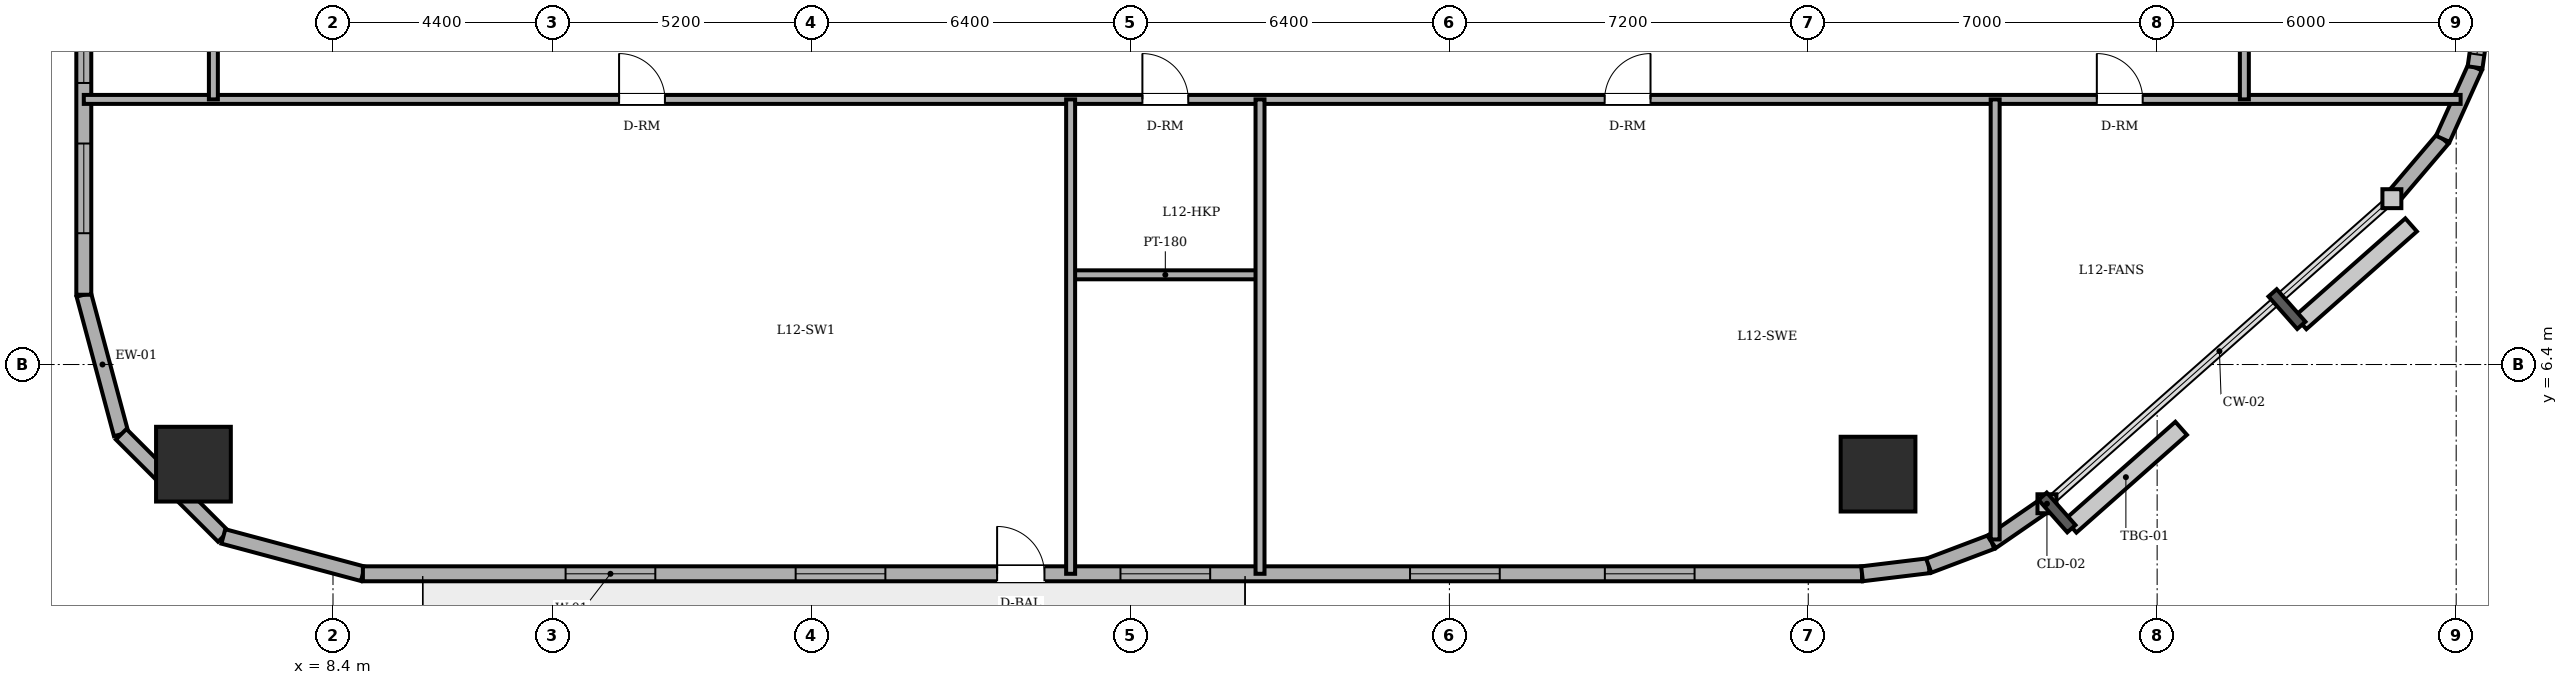
"""IFC4 building model, lengths in metres.
Left out: names, types, materials, properties, quantities, classifications, styles, units other than length and angle.
Written with IfcOpenShell. Run it as: python <this file> out.ifc"""

import sys

from ifc_helpers import new_model, si_unit, direction, frame, frame_2d, origin, origin_2d, place, context, subcontext, project, spatial, rectangle, circle, extrude, element, fill, save


model = new_model("IFC4")
c1 = context("Model", 3, precision=1e-05, world=origin(), true_north=direction((0.0, 1.0)))
c2 = subcontext(c1, "Body", "Model", "MODEL_VIEW")
j1 = project(units=[si_unit("LENGTHUNIT", "METRE"), si_unit("PLANEANGLEUNIT", "RADIAN")], contexts=[c1])
p1 = place(None, origin())
s1 = spatial("IfcSite", under=j1, at=p1, CompositionType="ELEMENT")
p2 = place(p1, origin())
s2 = spatial("IfcBuilding", under=s1, at=p2, CompositionType="ELEMENT")
p3 = place(p2, frame((0.0, 0.0, 46.8)))
s3 = spatial("IfcBuildingStorey", under=s2, at=p3, CompositionType="ELEMENT", Elevation=46.8)
for number, where, z_axis, x_axis in (
    (1, (5.6, 4.4, 0.0), (0.0, 0.0, 1.0), (1.0, 0.0, 0.0)),
    (2, (39.4, 4.2, 0.0), (0.0, 0.0, 1.0), (1.0, 0.0, 0.0)),
):
    element("IfcColumn", number, at=place(p3, frame(where, z_axis=z_axis, x_axis=x_axis)), inside=s3, PredefinedType="COLUMN", context=c2, shape_type="SweptSolid", body=[
        extrude(circle(Radius=0.75, at=origin_2d()), origin(), (0.0, 0.0, 1.0), 3.6),
    ])
p4 = place(p3, frame((3.4, 7.8, 0.0), z_axis=(0.0, 0.0, 1.0), x_axis=(0.258731875344, -0.96594917914, 0.0)))
e3 = element("IfcWall", 3, at=p4, inside=s3, PredefinedType="SOLIDWALL", context=c2, shape_type="SweptSolid", body=[
    extrude(rectangle(XDim=2.899, YDim=0.3, at=frame_2d((1.449, 0.0))), origin(), (0.0, 0.0, 1.0), 3.4),
])
p5 = place(p3, frame((4.15, 5.0, 0.0), z_axis=(0.0, 0.0, 1.0), x_axis=(0.707106781187, -0.707106781187, 0.0)))
e4 = element("IfcWall", 4, at=p5, inside=s3, PredefinedType="SOLIDWALL", context=c2, shape_type="SweptSolid", body=[
    extrude(rectangle(XDim=2.899, YDim=0.3, at=frame_2d((1.45, 0.0))), origin(), (0.0, 0.0, 1.0), 3.4),
])
p6 = place(p3, frame((6.2, 2.95, 0.0), z_axis=(0.0, 0.0, 1.0), x_axis=(0.96594917914, -0.258731875344, 0.0)))
e5 = element("IfcWall", 5, at=p6, inside=s3, PredefinedType="SOLIDWALL", context=c2, shape_type="SweptSolid", body=[
    extrude(rectangle(XDim=2.899, YDim=0.3, at=frame_2d((1.449, 0.0))), origin(), (0.0, 0.0, 1.0), 3.4),
])
p7 = place(p3, frame((9.0, 2.2, 0.0), z_axis=(0.0, 0.0, 1.0), x_axis=(1.0, 0.0, 0.0)))
e6 = element("IfcWall", 6, at=p7, inside=s3, PredefinedType="SOLIDWALL", context=c2, shape_type="SweptSolid", body=[
    extrude(rectangle(XDim=30.079, YDim=0.3, at=frame_2d((15.04, 0.0))), origin(), (0.0, 0.0, 1.0), 3.4),
])
p8 = place(p7, frame((12.725, 0.0, 0.0)))
e7 = element("IfcOpeningElement", 7, at=p8, cuts=e6, PredefinedType="OPENING", context=c2, shape_type="SweptSolid", body=[
    extrude(rectangle(XDim=0.95, YDim=2.2, at=frame_2d((0.475, 1.1))), frame((0.0, 0.16, 0.0), z_axis=(0.0, -1.0, 0.0), x_axis=(1.0, 0.0, 0.0)), (0.0, 0.0, 1.0), 0.32),
])
p9 = place(p7, frame((4.067, 0.0, 0.85)))
e8 = element("IfcOpeningElement", 8, at=p9, cuts=e6, PredefinedType="OPENING", context=c2, shape_type="SweptSolid", body=[
    extrude(rectangle(XDim=1.8, YDim=1.55, at=frame_2d((0.9, 0.775))), frame((0.0, 0.16, 0.0), z_axis=(0.0, -1.0, 0.0), x_axis=(1.0, 0.0, 0.0)), (0.0, 0.0, 1.0), 0.32),
])
p10 = place(p7, frame((8.683, 0.0, 0.85)))
e9 = element("IfcOpeningElement", 9, at=p10, cuts=e6, PredefinedType="OPENING", context=c2, shape_type="SweptSolid", body=[
    extrude(rectangle(XDim=1.8, YDim=1.55, at=frame_2d((0.9, 0.775))), frame((0.0, 0.16, 0.0), z_axis=(0.0, -1.0, 0.0), x_axis=(1.0, 0.0, 0.0)), (0.0, 0.0, 1.0), 0.32),
])
p11 = place(p7, frame((15.2, 0.0, 0.85)))
e10 = element("IfcOpeningElement", 10, at=p11, cuts=e6, PredefinedType="OPENING", context=c2, shape_type="SweptSolid", body=[
    extrude(rectangle(XDim=1.8, YDim=1.55, at=frame_2d((0.9, 0.775))), frame((0.0, 0.16, 0.0), z_axis=(0.0, -1.0, 0.0), x_axis=(1.0, 0.0, 0.0)), (0.0, 0.0, 1.0), 0.32),
])
p12 = place(p7, frame((21.01, 0.0, 0.85)))
e11 = element("IfcOpeningElement", 11, at=p12, cuts=e6, PredefinedType="OPENING", context=c2, shape_type="SweptSolid", body=[
    extrude(rectangle(XDim=1.8, YDim=1.55, at=frame_2d((0.9, 0.775))), frame((0.0, 0.16, 0.0), z_axis=(0.0, -1.0, 0.0), x_axis=(1.0, 0.0, 0.0)), (0.0, 0.0, 1.0), 0.32),
])
p13 = place(p7, frame((24.919, 0.0, 0.85)))
e12 = element("IfcOpeningElement", 12, at=p13, cuts=e6, PredefinedType="OPENING", context=c2, shape_type="SweptSolid", body=[
    extrude(rectangle(XDim=1.8, YDim=1.55, at=frame_2d((0.9, 0.775))), frame((0.0, 0.16, 0.0), z_axis=(0.0, -1.0, 0.0), x_axis=(1.0, 0.0, 0.0)), (0.0, 0.0, 1.0), 0.32),
])
p14 = place(p3, frame((39.079, 2.2, 0.0), z_axis=(0.0, 0.0, 1.0), x_axis=(0.992739027259, 0.120288086515, 0.0)))
e13 = element("IfcWall", 13, at=p14, inside=s3, PredefinedType="SOLIDWALL", context=c2, shape_type="SweptSolid", body=[
    extrude(rectangle(XDim=1.348, YDim=0.3, at=frame_2d((0.674, 0.0))), origin(), (0.0, 0.0, 1.0), 3.4),
])
p15 = place(p3, frame((40.417, 2.362, 0.0), z_axis=(0.0, 0.0, 1.0), x_axis=(0.935156721165, 0.354234254216, 0.0)))
e14 = element("IfcWall", 14, at=p15, inside=s3, PredefinedType="SOLIDWALL", context=c2, shape_type="SweptSolid", body=[
    extrude(rectangle(XDim=1.349, YDim=0.3, at=frame_2d((0.675, 0.0))), origin(), (0.0, 0.0, 1.0), 3.4),
])
p16 = place(p3, frame((41.679, 2.84, 0.0), z_axis=(0.0, 0.0, 1.0), x_axis=(0.823116500192, 0.567872544777, 0.0)))
e15 = element("IfcWall", 15, at=p16, inside=s3, PredefinedType="SOLIDWALL", context=c2, shape_type="SweptSolid", body=[
    extrude(rectangle(XDim=1.349, YDim=0.3, at=frame_2d((0.674, 0.0))), origin(), (0.0, 0.0, 1.0), 3.4),
])
p17 = place(p3, frame((49.71, 9.728, 0.0), z_axis=(0.0, 0.0, 1.0), x_axis=(0.648389989909, 0.7613083613, 0.0)))
e16 = element("IfcWall", 16, at=p17, inside=s3, PredefinedType="SOLIDWALL", context=c2, shape_type="SweptSolid", body=[
    extrude(rectangle(XDim=1.576, YDim=0.3, at=frame_2d((0.788, 0.0))), origin(), (0.0, 0.0, 1.0), 3.4),
])
p18 = place(p3, frame((50.732, 10.928, 0.0), z_axis=(0.0, 0.0, 1.0), x_axis=(0.410996558744, 0.911636895206, 0.0)))
e17 = element("IfcWall", 17, at=p18, inside=s3, PredefinedType="SOLIDWALL", context=c2, shape_type="SweptSolid", body=[
    extrude(rectangle(XDim=1.574, YDim=0.3, at=frame_2d((0.787, 0.0))), origin(), (0.0, 0.0, 1.0), 3.4),
])
p19 = place(p3, frame((51.379, 12.363, 0.0), z_axis=(0.0, 0.0, 1.0), x_axis=(0.140380048512, 0.990097693149, 0.0)))
e18 = element("IfcWall", 18, at=p19, inside=s3, PredefinedType="SOLIDWALL", context=c2, shape_type="SweptSolid", body=[
    extrude(rectangle(XDim=1.576, YDim=0.3, at=frame_2d((0.788, 0.0))), origin(), (0.0, 0.0, 1.0), 3.4),
])
p20 = place(p19, frame((0.263, 0.0, 0.85)))
e19 = element("IfcOpeningElement", 19, at=p20, cuts=e18, PredefinedType="OPENING", context=c2, shape_type="SweptSolid", body=[
    extrude(rectangle(XDim=1.05, YDim=1.55, at=frame_2d((0.525, 0.775))), frame((0.0, 0.16, 0.0), z_axis=(0.0, -1.0, 0.0), x_axis=(1.0, 0.0, 0.0)), (0.0, 0.0, 1.0), 0.32),
])
p21 = place(p3, frame((3.4, 40.2, 0.0), z_axis=(0.0, 0.0, 1.0), x_axis=(0.0, -1.0, 0.0)))
e20 = element("IfcWall", 20, at=p21, inside=s3, PredefinedType="SOLIDWALL", context=c2, shape_type="SweptSolid", body=[
    extrude(rectangle(XDim=32.4, YDim=0.3, at=frame_2d((16.2, 0.0))), origin(), (0.0, 0.0, 1.0), 3.4),
])
p22 = place(p21, frame((1.235, 0.0, 0.85)))
e21 = element("IfcOpeningElement", 21, at=p22, cuts=e20, PredefinedType="OPENING", context=c2, shape_type="SweptSolid", body=[
    extrude(rectangle(XDim=1.8, YDim=1.55, at=frame_2d((0.9, 0.775))), frame((0.0, 0.16, 0.0), z_axis=(0.0, -1.0, 0.0), x_axis=(1.0, 0.0, 0.0)), (0.0, 0.0, 1.0), 0.32),
])
p23 = place(p21, frame((4.25, 0.0, 0.85)))
e22 = element("IfcOpeningElement", 22, at=p23, cuts=e20, PredefinedType="OPENING", context=c2, shape_type="SweptSolid", body=[
    extrude(rectangle(XDim=1.8, YDim=1.55, at=frame_2d((0.9, 0.775))), frame((0.0, 0.16, 0.0), z_axis=(0.0, -1.0, 0.0), x_axis=(1.0, 0.0, 0.0)), (0.0, 0.0, 1.0), 0.32),
])
p24 = place(p21, frame((9.253, 0.0, 0.85)))
e23 = element("IfcOpeningElement", 23, at=p24, cuts=e20, PredefinedType="OPENING", context=c2, shape_type="SweptSolid", body=[
    extrude(rectangle(XDim=1.8, YDim=1.55, at=frame_2d((0.9, 0.775))), frame((0.0, 0.16, 0.0), z_axis=(0.0, -1.0, 0.0), x_axis=(1.0, 0.0, 0.0)), (0.0, 0.0, 1.0), 0.32),
])
p25 = place(p21, frame((13.027, 0.0, 0.85)))
e24 = element("IfcOpeningElement", 24, at=p25, cuts=e20, PredefinedType="OPENING", context=c2, shape_type="SweptSolid", body=[
    extrude(rectangle(XDim=1.8, YDim=1.55, at=frame_2d((0.9, 0.775))), frame((0.0, 0.16, 0.0), z_axis=(0.0, -1.0, 0.0), x_axis=(1.0, 0.0, 0.0)), (0.0, 0.0, 1.0), 0.32),
])
p26 = place(p21, frame((19.573, 0.0, 0.85)))
e25 = element("IfcOpeningElement", 25, at=p26, cuts=e20, PredefinedType="OPENING", context=c2, shape_type="SweptSolid", body=[
    extrude(rectangle(XDim=1.8, YDim=1.55, at=frame_2d((0.9, 0.775))), frame((0.0, 0.16, 0.0), z_axis=(0.0, -1.0, 0.0), x_axis=(1.0, 0.0, 0.0)), (0.0, 0.0, 1.0), 0.32),
])
p27 = place(p21, frame((22.347, 0.0, 0.85)))
e26 = element("IfcOpeningElement", 26, at=p27, cuts=e20, PredefinedType="OPENING", context=c2, shape_type="SweptSolid", body=[
    extrude(rectangle(XDim=1.8, YDim=1.55, at=frame_2d((0.9, 0.775))), frame((0.0, 0.16, 0.0), z_axis=(0.0, -1.0, 0.0), x_axis=(1.0, 0.0, 0.0)), (0.0, 0.0, 1.0), 0.32),
])
p28 = place(p21, frame((26.35, 0.0, 0.85)))
e27 = element("IfcOpeningElement", 27, at=p28, cuts=e20, PredefinedType="OPENING", context=c2, shape_type="SweptSolid", body=[
    extrude(rectangle(XDim=1.8, YDim=1.55, at=frame_2d((0.9, 0.775))), frame((0.0, 0.16, 0.0), z_axis=(0.0, -1.0, 0.0), x_axis=(1.0, 0.0, 0.0)), (0.0, 0.0, 1.0), 0.32),
])
p29 = place(p21, frame((29.365, 0.0, 0.85)))
e28 = element("IfcOpeningElement", 28, at=p29, cuts=e20, PredefinedType="OPENING", context=c2, shape_type="SweptSolid", body=[
    extrude(rectangle(XDim=1.8, YDim=1.55, at=frame_2d((0.9, 0.775))), frame((0.0, 0.16, 0.0), z_axis=(0.0, -1.0, 0.0), x_axis=(1.0, 0.0, 0.0)), (0.0, 0.0, 1.0), 0.32),
])
p30 = place(p3, frame((23.2, 8.2, 0.0), z_axis=(0.0, 0.0, 1.0), x_axis=(1.0, 0.0, 0.0)))
e29 = element("IfcWall", 29, at=p30, inside=s3, PredefinedType="PARTITIONING", context=c2, shape_type="SweptSolid", body=[
    extrude(rectangle(XDim=3.8, YDim=0.18, at=frame_2d((1.9, 0.0))), origin(), (0.0, 0.0, 1.0), 3.4),
])
p31 = place(p3, frame((3.4, 11.72, 0.0), z_axis=(0.0, 0.0, 1.0), x_axis=(1.0, 0.0, 0.0)))
e30 = element("IfcWall", 30, at=p31, inside=s3, PredefinedType="PARTITIONING", context=c2, shape_type="SweptSolid", body=[
    extrude(rectangle(XDim=47.689, YDim=0.18, at=frame_2d((23.845, 0.0))), origin(), (0.0, 0.0, 1.0), 3.4),
])
p32 = place(p31, frame((21.24, 0.0, 0.0)))
e31 = element("IfcOpeningElement", 31, at=p32, cuts=e30, PredefinedType="OPENING", context=c2, shape_type="SweptSolid", body=[
    extrude(rectangle(XDim=0.92, YDim=2.1, at=frame_2d((0.46, 1.05))), frame((0.0, 0.1, 0.0), z_axis=(0.0, -1.0, 0.0), x_axis=(1.0, 0.0, 0.0)), (0.0, 0.0, 1.0), 0.2),
])
p33 = place(p31, frame((40.39, 0.0, 0.0)))
e32 = element("IfcOpeningElement", 32, at=p33, cuts=e30, PredefinedType="OPENING", context=c2, shape_type="SweptSolid", body=[
    extrude(rectangle(XDim=0.92, YDim=2.1, at=frame_2d((0.46, 1.05))), frame((0.0, 0.1, 0.0), z_axis=(0.0, -1.0, 0.0), x_axis=(1.0, 0.0, 0.0)), (0.0, 0.0, 1.0), 0.2),
])
p34 = place(p31, frame((10.74, 0.0, 0.0)))
e33 = element("IfcOpeningElement", 33, at=p34, cuts=e30, PredefinedType="OPENING", context=c2, shape_type="SweptSolid", body=[
    extrude(rectangle(XDim=0.92, YDim=2.1, at=frame_2d((0.46, 1.05))), frame((0.0, 0.1, 0.0), z_axis=(0.0, -1.0, 0.0), x_axis=(1.0, 0.0, 0.0)), (0.0, 0.0, 1.0), 0.2),
])
p35 = place(p31, frame((30.515, 0.0, 0.0)))
e34 = element("IfcOpeningElement", 34, at=p35, cuts=e30, PredefinedType="OPENING", context=c2, shape_type="SweptSolid", body=[
    extrude(rectangle(XDim=0.92, YDim=2.1, at=frame_2d((0.46, 1.05))), frame((0.0, 0.1, 0.0), z_axis=(0.0, -1.0, 0.0), x_axis=(1.0, 0.0, 0.0)), (0.0, 0.0, 1.0), 0.2),
])
p36 = place(p3, frame((6.0, 11.72, 0.0), z_axis=(0.0, 0.0, 1.0), x_axis=(0.0, 1.0, 0.0)))
e35 = element("IfcWall", 35, at=p36, inside=s3, PredefinedType="PARTITIONING", context=c2, shape_type="SweptSolid", body=[
    extrude(rectangle(XDim=2.46, YDim=0.18, at=frame_2d((1.23, 0.0))), origin(), (0.0, 0.0, 1.0), 3.4),
])
for number, where, z_axis, x_axis in (
    (36, (23.2, 2.2, 0.0), (0.0, 0.0, 1.0), (0.0, 1.0, 0.0)),
    (37, (27.0, 2.2, 0.0), (0.0, 0.0, 1.0), (0.0, 1.0, 0.0)),
):
    element("IfcWall", number, at=place(p3, frame(where, z_axis=z_axis, x_axis=x_axis)), inside=s3, PredefinedType="PARTITIONING", context=c2, shape_type="SweptSolid", body=[
        extrude(rectangle(XDim=9.52, YDim=0.18, at=frame_2d((4.76, 0.0))), origin(), (0.0, 0.0, 1.0), 3.4),
    ])
p37 = place(p3, frame((41.75, 2.889, 0.0), z_axis=(0.0, 0.0, 1.0), x_axis=(0.0, 1.0, 0.0)))
e38 = element("IfcWall", 38, at=p37, inside=s3, PredefinedType="PARTITIONING", context=c2, shape_type="SweptSolid", body=[
    extrude(rectangle(XDim=8.831, YDim=0.18, at=frame_2d((4.416, 0.0))), origin(), (0.0, 0.0, 1.0), 2.782),
])
p38 = place(p3, frame((46.75, 11.72, 0.0), z_axis=(0.0, 0.0, 1.0), x_axis=(0.0, 1.0, 0.0)))
e39 = element("IfcWall", 39, at=p38, inside=s3, PredefinedType="PARTITIONING", context=c2, shape_type="SweptSolid", body=[
    extrude(rectangle(XDim=2.46, YDim=0.18, at=frame_2d((1.23, 0.0))), origin(), (0.0, 0.0, 1.0), 3.4),
])
p39 = place(p8, origin())
e40 = element("IfcDoor", 40, at=p39, inside=s3, OperationType="SINGLE_SWING_LEFT", PredefinedType="DOOR", context=c2, shape_type="SweptSolid", body=[
    extrude(rectangle(XDim=0.95, YDim=2.2, at=frame_2d((0.475, 1.1))), frame((0.0, 0.025, 0.0), z_axis=(0.0, -1.0, 0.0), x_axis=(1.0, 0.0, 0.0)), (0.0, 0.0, 1.0), 0.05),
])
fill(e7, e40)
p40 = place(p9, origin())
e41 = element("IfcWindow", 41, at=p40, inside=s3, PartitioningType="DOUBLE_PANEL_VERTICAL", PredefinedType="WINDOW", context=c2, shape_type="SweptSolid", body=[
    extrude(rectangle(XDim=1.8, YDim=1.55, at=frame_2d((0.9, 0.775))), frame((0.0, 0.03, 0.0), z_axis=(0.0, -1.0, 0.0), x_axis=(1.0, 0.0, 0.0)), (0.0, 0.0, 1.0), 0.06),
])
fill(e8, e41)
p41 = place(p10, origin())
e42 = element("IfcWindow", 42, at=p41, inside=s3, PartitioningType="DOUBLE_PANEL_VERTICAL", PredefinedType="WINDOW", context=c2, shape_type="SweptSolid", body=[
    extrude(rectangle(XDim=1.8, YDim=1.55, at=frame_2d((0.9, 0.775))), frame((0.0, 0.03, 0.0), z_axis=(0.0, -1.0, 0.0), x_axis=(1.0, 0.0, 0.0)), (0.0, 0.0, 1.0), 0.06),
])
fill(e9, e42)
p42 = place(p11, origin())
e43 = element("IfcWindow", 43, at=p42, inside=s3, PartitioningType="DOUBLE_PANEL_VERTICAL", PredefinedType="WINDOW", context=c2, shape_type="SweptSolid", body=[
    extrude(rectangle(XDim=1.8, YDim=1.55, at=frame_2d((0.9, 0.775))), frame((0.0, 0.03, 0.0), z_axis=(0.0, -1.0, 0.0), x_axis=(1.0, 0.0, 0.0)), (0.0, 0.0, 1.0), 0.06),
])
fill(e10, e43)
p43 = place(p12, origin())
e44 = element("IfcWindow", 44, at=p43, inside=s3, PartitioningType="DOUBLE_PANEL_VERTICAL", PredefinedType="WINDOW", context=c2, shape_type="SweptSolid", body=[
    extrude(rectangle(XDim=1.8, YDim=1.55, at=frame_2d((0.9, 0.775))), frame((0.0, 0.03, 0.0), z_axis=(0.0, -1.0, 0.0), x_axis=(1.0, 0.0, 0.0)), (0.0, 0.0, 1.0), 0.06),
])
fill(e11, e44)
p44 = place(p13, origin())
e45 = element("IfcWindow", 45, at=p44, inside=s3, PartitioningType="DOUBLE_PANEL_VERTICAL", PredefinedType="WINDOW", context=c2, shape_type="SweptSolid", body=[
    extrude(rectangle(XDim=1.8, YDim=1.55, at=frame_2d((0.9, 0.775))), frame((0.0, 0.03, 0.0), z_axis=(0.0, -1.0, 0.0), x_axis=(1.0, 0.0, 0.0)), (0.0, 0.0, 1.0), 0.06),
])
fill(e12, e45)
p45 = place(p28, origin())
e46 = element("IfcWindow", 46, at=p45, inside=s3, PartitioningType="DOUBLE_PANEL_VERTICAL", PredefinedType="WINDOW", context=c2, shape_type="SweptSolid", body=[
    extrude(rectangle(XDim=1.8, YDim=1.55, at=frame_2d((0.9, 0.775))), frame((0.0, 0.03, 0.0), z_axis=(0.0, -1.0, 0.0), x_axis=(1.0, 0.0, 0.0)), (0.0, 0.0, 1.0), 0.06),
])
fill(e27, e46)
p46 = place(p29, origin())
e47 = element("IfcWindow", 47, at=p46, inside=s3, PartitioningType="DOUBLE_PANEL_VERTICAL", PredefinedType="WINDOW", context=c2, shape_type="SweptSolid", body=[
    extrude(rectangle(XDim=1.8, YDim=1.55, at=frame_2d((0.9, 0.775))), frame((0.0, 0.03, 0.0), z_axis=(0.0, -1.0, 0.0), x_axis=(1.0, 0.0, 0.0)), (0.0, 0.0, 1.0), 0.06),
])
fill(e28, e47)
p47 = place(p20, origin())
e48 = element("IfcWindow", 48, at=p47, inside=s3, PartitioningType="SINGLE_PANEL", PredefinedType="WINDOW", context=c2, shape_type="SweptSolid", body=[
    extrude(rectangle(XDim=1.05, YDim=1.55, at=frame_2d((0.525, 0.775))), frame((0.0, 0.03, 0.0), z_axis=(0.0, -1.0, 0.0), x_axis=(1.0, 0.0, 0.0)), (0.0, 0.0, 1.0), 0.06),
])
fill(e19, e48)
p48 = place(p32, origin())
e49 = element("IfcDoor", 49, at=p48, inside=s3, OperationType="SINGLE_SWING_LEFT", PredefinedType="DOOR", context=c2, shape_type="SweptSolid", body=[
    extrude(rectangle(XDim=0.92, YDim=2.1, at=frame_2d((0.46, 1.05))), frame((0.0, 0.025, 0.0), z_axis=(0.0, -1.0, 0.0), x_axis=(1.0, 0.0, 0.0)), (0.0, 0.0, 1.0), 0.05),
])
fill(e31, e49)
p49 = place(p33, origin())
e50 = element("IfcDoor", 50, at=p49, inside=s3, OperationType="SINGLE_SWING_LEFT", PredefinedType="DOOR", context=c2, shape_type="SweptSolid", body=[
    extrude(rectangle(XDim=0.92, YDim=2.1, at=frame_2d((0.46, 1.05))), frame((0.0, 0.025, 0.0), z_axis=(0.0, -1.0, 0.0), x_axis=(1.0, 0.0, 0.0)), (0.0, 0.0, 1.0), 0.05),
])
fill(e32, e50)
p50 = place(p34, origin())
e51 = element("IfcDoor", 51, at=p50, inside=s3, OperationType="SINGLE_SWING_LEFT", PredefinedType="DOOR", context=c2, shape_type="SweptSolid", body=[
    extrude(rectangle(XDim=0.92, YDim=2.1, at=frame_2d((0.46, 1.05))), frame((0.0, 0.025, 0.0), z_axis=(0.0, -1.0, 0.0), x_axis=(1.0, 0.0, 0.0)), (0.0, 0.0, 1.0), 0.05),
])
fill(e33, e51)
p51 = place(p35, origin())
e52 = element("IfcDoor", 52, at=p51, inside=s3, OperationType="SINGLE_SWING_RIGHT", PredefinedType="DOOR", context=c2, shape_type="SweptSolid", body=[
    extrude(rectangle(XDim=0.92, YDim=2.1, at=frame_2d((0.46, 1.05))), frame((0.0, 0.025, 0.0), z_axis=(0.0, -1.0, 0.0), x_axis=(1.0, 0.0, 0.0)), (0.0, 0.0, 1.0), 0.05),
])
fill(e34, e52)
save(model, sys.argv[1])
